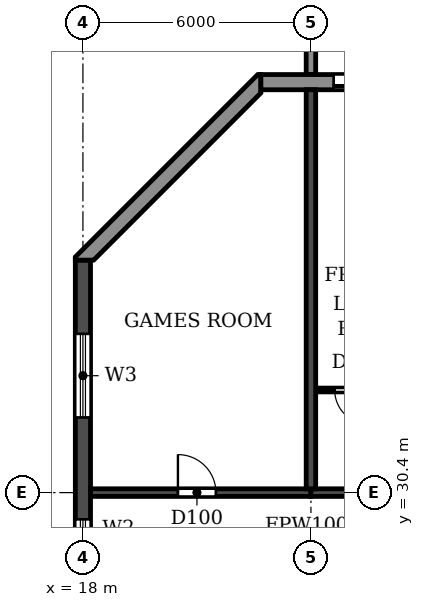
"""IFC4 building model, lengths in metres.
Left out: names, types, materials, properties, quantities, classifications, styles, units other than length and angle.
Written with IfcOpenShell. Run it as: python <this file> out.ifc"""

import sys

from ifc_helpers import new_model, si_unit, direction, frame, frame_2d, origin, place, context, subcontext, project, spatial, polyline, rectangle, outline, extrude, source, transform, mapped, element, fill, save


model = new_model("IFC4")
c1 = context("Model", 3, precision=1e-05, world=origin(), true_north=direction((0.0, 1.0)))
c2 = subcontext(c1, "Body", "Model", "MODEL_VIEW")
j1 = project(units=[si_unit("LENGTHUNIT", "METRE"), si_unit("PLANEANGLEUNIT", "RADIAN")], contexts=[c1])
p1 = place(None, origin())
s1 = spatial("IfcSite", under=j1, at=p1, CompositionType="ELEMENT")
p2 = place(p1, origin())
s2 = spatial("IfcBuilding", under=s1, at=p2, CompositionType="ELEMENT")
p3 = place(p2, frame((0.0, 0.0, 231.3)))
s3 = spatial("IfcBuildingStorey", under=s2, at=p3, CompositionType="ELEMENT", Elevation=231.3)
p4 = place(p3, frame((24.0, 30.5, 0.0), z_axis=(0.0, 0.0, 1.0), x_axis=(0.0, 1.0, 0.0)))
e1 = element("IfcWall", 1, at=p4, inside=s3, PredefinedType="SHEAR", context=c2, shape_type="SweptSolid", body=[
    extrude(rectangle(XDim=10.5, YDim=0.25, at=frame_2d((5.25, 0.0))), origin(), (0.0, 0.0, 1.0), 3.08),
])
p5 = place(p3, frame((18.0, 4.683, 0.0), z_axis=(0.0, 0.0, 1.0), x_axis=(0.0, 1.0, 0.0)))
e2 = element("IfcWall", 2, at=p5, inside=s3, PredefinedType="SHEAR", context=c2, shape_type="SweptSolid", body=[
    extrude(rectangle(XDim=31.834, YDim=0.4, at=frame_2d((15.917, 0.0))), origin(), (0.0, 0.0, 1.0), 3.08),
])
p6 = place(p5, frame((23.817, 0.0, 0.9)))
e3 = element("IfcOpeningElement", 3, at=p6, cuts=e2, PredefinedType="OPENING", context=c2, shape_type="SweptSolid", body=[
    extrude(rectangle(XDim=1.2, YDim=1.5, at=frame_2d((0.6, 0.75))), frame((0.0, 0.21, 0.0), z_axis=(0.0, -1.0, 0.0), x_axis=(1.0, 0.0, 0.0)), (0.0, 0.0, 1.0), 0.42),
])
p7 = place(p5, frame((8.017, 0.0, 0.9)))
e4 = element("IfcOpeningElement", 4, at=p7, cuts=e2, PredefinedType="OPENING", context=c2, shape_type="SweptSolid", body=[
    extrude(rectangle(XDim=1.2, YDim=1.5, at=frame_2d((0.6, 0.75))), frame((0.0, 0.21, 0.0), z_axis=(0.0, -1.0, 0.0), x_axis=(1.0, 0.0, 0.0)), (0.0, 0.0, 1.0), 0.42),
])
p8 = place(p5, frame((27.694, 0.0, 0.6)))
e5 = element("IfcOpeningElement", 5, at=p8, cuts=e2, PredefinedType="OPENING", context=c2, shape_type="SweptSolid", body=[
    extrude(rectangle(XDim=2.2, YDim=1.8, at=frame_2d((1.1, 0.9))), frame((0.0, 0.21, 0.0), z_axis=(0.0, -1.0, 0.0), x_axis=(1.0, 0.0, 0.0)), (0.0, 0.0, 1.0), 0.42),
])
p9 = place(p5, frame((2.541, 0.0, 0.6)))
e6 = element("IfcOpeningElement", 6, at=p9, cuts=e2, PredefinedType="OPENING", context=c2, shape_type="SweptSolid", body=[
    extrude(rectangle(XDim=2.2, YDim=1.8, at=frame_2d((1.1, 0.9))), frame((0.0, 0.21, 0.0), z_axis=(0.0, -1.0, 0.0), x_axis=(1.0, 0.0, 0.0)), (0.0, 0.0, 1.0), 0.42),
])
p10 = place(p5, frame((15.917, 0.0, 0.9)))
e7 = element("IfcOpeningElement", 7, at=p10, cuts=e2, PredefinedType="OPENING", context=c2, shape_type="SweptSolid", body=[
    extrude(rectangle(XDim=1.2, YDim=1.5, at=frame_2d((0.6, 0.75))), frame((0.0, 0.21, 0.0), z_axis=(0.0, -1.0, 0.0), x_axis=(1.0, 0.0, 0.0)), (0.0, 0.0, 1.0), 0.42),
])
p11 = place(p3, frame((18.2, 30.4, 0.0), z_axis=(0.0, 0.0, 1.0), x_axis=(1.0, 0.0, 0.0)))
e8 = element("IfcWall", 8, at=p11, inside=s3, PredefinedType="SHEAR", context=c2, shape_type="SweptSolid", body=[
    extrude(rectangle(XDim=5.8, YDim=0.2, at=frame_2d((2.9, 0.0))), origin(), (0.0, 0.0, 1.0), 2.48),
])
p12 = place(p11, frame((2.3, 0.0, 0.0)))
e9 = element("IfcOpeningElement", 9, at=p12, cuts=e8, PredefinedType="OPENING", context=c2, shape_type="SweptSolid", body=[
    extrude(rectangle(XDim=1.0, YDim=2.1, at=frame_2d((0.5, 1.05))), frame((0.0, 0.11, 0.0), z_axis=(0.0, -1.0, 0.0), x_axis=(1.0, 0.0, 0.0)), (0.0, 0.0, 1.0), 0.22),
])
p13 = place(p3, frame((24.0, 30.4, 0.0), z_axis=(0.0, 0.0, 1.0), x_axis=(1.0, 0.0, 0.0)))
e10 = element("IfcWall", 10, at=p13, inside=s3, PredefinedType="SHEAR", context=c2, shape_type="SweptSolid", body=[
    extrude(rectangle(XDim=6.0, YDim=0.2, at=frame_2d((3.0, 0.0))), origin(), (0.0, 0.0, 1.0), 2.48),
])
p14 = place(p13, frame((2.55, 0.0, 0.0)))
e11 = element("IfcOpeningElement", 11, at=p14, cuts=e10, PredefinedType="OPENING", context=c2, shape_type="SweptSolid", body=[
    extrude(rectangle(XDim=1.0, YDim=2.1, at=frame_2d((0.5, 1.05))), frame((0.0, 0.11, 0.0), z_axis=(0.0, -1.0, 0.0), x_axis=(1.0, 0.0, 0.0)), (0.0, 0.0, 1.0), 0.22),
])
p15 = place(p3, frame((79.317, 41.2, 0.0), z_axis=(0.0, 0.0, 1.0), x_axis=(-1.0, 0.0, 0.0)))
e12 = element("IfcWall", 12, at=p15, inside=s3, PredefinedType="STANDARD", context=c2, shape_type="SweptSolid", body=[
    extrude(rectangle(XDim=56.634, YDim=0.4, at=frame_2d((28.317, 0.0))), origin(), (0.0, 0.0, 1.0), 3.08),
])
p16 = place(p15, frame((52.917, 0.0, 0.0)))
e13 = element("IfcOpeningElement", 13, at=p16, cuts=e12, PredefinedType="OPENING", context=c2, shape_type="SweptSolid", body=[
    extrude(rectangle(XDim=1.8, YDim=2.4, at=frame_2d((0.9, 1.2))), frame((0.0, 0.21, 0.0), z_axis=(0.0, -1.0, 0.0), x_axis=(1.0, 0.0, 0.0)), (0.0, 0.0, 1.0), 0.42),
])
p17 = place(p15, frame((49.717, 0.0, 0.9)))
e14 = element("IfcOpeningElement", 14, at=p17, cuts=e12, PredefinedType="OPENING", context=c2, shape_type="SweptSolid", body=[
    extrude(rectangle(XDim=2.2, YDim=1.5, at=frame_2d((1.1, 0.75))), frame((0.0, 0.21, 0.0), z_axis=(0.0, -1.0, 0.0), x_axis=(1.0, 0.0, 0.0)), (0.0, 0.0, 1.0), 0.42),
])
p18 = place(p15, frame((46.717, 0.0, 0.9)))
e15 = element("IfcOpeningElement", 15, at=p18, cuts=e12, PredefinedType="OPENING", context=c2, shape_type="SweptSolid", body=[
    extrude(rectangle(XDim=2.2, YDim=1.5, at=frame_2d((1.1, 0.75))), frame((0.0, 0.21, 0.0), z_axis=(0.0, -1.0, 0.0), x_axis=(1.0, 0.0, 0.0)), (0.0, 0.0, 1.0), 0.42),
])
p19 = place(p15, frame((43.717, 0.0, 0.9)))
e16 = element("IfcOpeningElement", 16, at=p19, cuts=e12, PredefinedType="OPENING", context=c2, shape_type="SweptSolid", body=[
    extrude(rectangle(XDim=2.2, YDim=1.5, at=frame_2d((1.1, 0.75))), frame((0.0, 0.21, 0.0), z_axis=(0.0, -1.0, 0.0), x_axis=(1.0, 0.0, 0.0)), (0.0, 0.0, 1.0), 0.42),
])
p20 = place(p15, frame((40.717, 0.0, 0.9)))
e17 = element("IfcOpeningElement", 17, at=p20, cuts=e12, PredefinedType="OPENING", context=c2, shape_type="SweptSolid", body=[
    extrude(rectangle(XDim=2.2, YDim=1.5, at=frame_2d((1.1, 0.75))), frame((0.0, 0.21, 0.0), z_axis=(0.0, -1.0, 0.0), x_axis=(1.0, 0.0, 0.0)), (0.0, 0.0, 1.0), 0.42),
])
p21 = place(p15, frame((37.917, 0.0, 0.0)))
e18 = element("IfcOpeningElement", 18, at=p21, cuts=e12, PredefinedType="OPENING", context=c2, shape_type="SweptSolid", body=[
    extrude(rectangle(XDim=1.8, YDim=2.4, at=frame_2d((0.9, 1.2))), frame((0.0, 0.21, 0.0), z_axis=(0.0, -1.0, 0.0), x_axis=(1.0, 0.0, 0.0)), (0.0, 0.0, 1.0), 0.42),
])
p22 = place(p15, frame((34.717, 0.0, 0.9)))
e19 = element("IfcOpeningElement", 19, at=p22, cuts=e12, PredefinedType="OPENING", context=c2, shape_type="SweptSolid", body=[
    extrude(rectangle(XDim=2.2, YDim=1.5, at=frame_2d((1.1, 0.75))), frame((0.0, 0.21, 0.0), z_axis=(0.0, -1.0, 0.0), x_axis=(1.0, 0.0, 0.0)), (0.0, 0.0, 1.0), 0.42),
])
p23 = place(p15, frame((31.917, 0.0, 0.0)))
e20 = element("IfcOpeningElement", 20, at=p23, cuts=e12, PredefinedType="OPENING", context=c2, shape_type="SweptSolid", body=[
    extrude(rectangle(XDim=1.8, YDim=2.4, at=frame_2d((0.9, 1.2))), frame((0.0, 0.21, 0.0), z_axis=(0.0, -1.0, 0.0), x_axis=(1.0, 0.0, 0.0)), (0.0, 0.0, 1.0), 0.42),
])
p24 = place(p15, frame((28.717, 0.0, 0.9)))
e21 = element("IfcOpeningElement", 21, at=p24, cuts=e12, PredefinedType="OPENING", context=c2, shape_type="SweptSolid", body=[
    extrude(rectangle(XDim=2.2, YDim=1.5, at=frame_2d((1.1, 0.75))), frame((0.0, 0.21, 0.0), z_axis=(0.0, -1.0, 0.0), x_axis=(1.0, 0.0, 0.0)), (0.0, 0.0, 1.0), 0.42),
])
p25 = place(p15, frame((25.917, 0.0, 0.0)))
e22 = element("IfcOpeningElement", 22, at=p25, cuts=e12, PredefinedType="OPENING", context=c2, shape_type="SweptSolid", body=[
    extrude(rectangle(XDim=1.8, YDim=2.4, at=frame_2d((0.9, 1.2))), frame((0.0, 0.21, 0.0), z_axis=(0.0, -1.0, 0.0), x_axis=(1.0, 0.0, 0.0)), (0.0, 0.0, 1.0), 0.42),
])
p26 = place(p15, frame((22.717, 0.0, 0.9)))
e23 = element("IfcOpeningElement", 23, at=p26, cuts=e12, PredefinedType="OPENING", context=c2, shape_type="SweptSolid", body=[
    extrude(rectangle(XDim=2.2, YDim=1.5, at=frame_2d((1.1, 0.75))), frame((0.0, 0.21, 0.0), z_axis=(0.0, -1.0, 0.0), x_axis=(1.0, 0.0, 0.0)), (0.0, 0.0, 1.0), 0.42),
])
p27 = place(p15, frame((19.717, 0.0, 0.9)))
e24 = element("IfcOpeningElement", 24, at=p27, cuts=e12, PredefinedType="OPENING", context=c2, shape_type="SweptSolid", body=[
    extrude(rectangle(XDim=2.2, YDim=1.5, at=frame_2d((1.1, 0.75))), frame((0.0, 0.21, 0.0), z_axis=(0.0, -1.0, 0.0), x_axis=(1.0, 0.0, 0.0)), (0.0, 0.0, 1.0), 0.42),
])
p28 = place(p15, frame((16.717, 0.0, 0.9)))
e25 = element("IfcOpeningElement", 25, at=p28, cuts=e12, PredefinedType="OPENING", context=c2, shape_type="SweptSolid", body=[
    extrude(rectangle(XDim=2.2, YDim=1.5, at=frame_2d((1.1, 0.75))), frame((0.0, 0.21, 0.0), z_axis=(0.0, -1.0, 0.0), x_axis=(1.0, 0.0, 0.0)), (0.0, 0.0, 1.0), 0.42),
])
p29 = place(p15, frame((13.917, 0.0, 0.0)))
e26 = element("IfcOpeningElement", 26, at=p29, cuts=e12, PredefinedType="OPENING", context=c2, shape_type="SweptSolid", body=[
    extrude(rectangle(XDim=1.8, YDim=2.4, at=frame_2d((0.9, 1.2))), frame((0.0, 0.21, 0.0), z_axis=(0.0, -1.0, 0.0), x_axis=(1.0, 0.0, 0.0)), (0.0, 0.0, 1.0), 0.42),
])
p30 = place(p15, frame((10.717, 0.0, 0.9)))
e27 = element("IfcOpeningElement", 27, at=p30, cuts=e12, PredefinedType="OPENING", context=c2, shape_type="SweptSolid", body=[
    extrude(rectangle(XDim=2.2, YDim=1.5, at=frame_2d((1.1, 0.75))), frame((0.0, 0.21, 0.0), z_axis=(0.0, -1.0, 0.0), x_axis=(1.0, 0.0, 0.0)), (0.0, 0.0, 1.0), 0.42),
])
p31 = place(p15, frame((7.917, 0.0, 0.0)))
e28 = element("IfcOpeningElement", 28, at=p31, cuts=e12, PredefinedType="OPENING", context=c2, shape_type="SweptSolid", body=[
    extrude(rectangle(XDim=1.8, YDim=2.4, at=frame_2d((0.9, 1.2))), frame((0.0, 0.21, 0.0), z_axis=(0.0, -1.0, 0.0), x_axis=(1.0, 0.0, 0.0)), (0.0, 0.0, 1.0), 0.42),
])
p32 = place(p15, frame((4.717, 0.0, 0.9)))
e29 = element("IfcOpeningElement", 29, at=p32, cuts=e12, PredefinedType="OPENING", context=c2, shape_type="SweptSolid", body=[
    extrude(rectangle(XDim=2.2, YDim=1.5, at=frame_2d((1.1, 0.75))), frame((0.0, 0.21, 0.0), z_axis=(0.0, -1.0, 0.0), x_axis=(1.0, 0.0, 0.0)), (0.0, 0.0, 1.0), 0.42),
])
p33 = place(p15, frame((1.917, 0.0, 0.0)))
e30 = element("IfcOpeningElement", 30, at=p33, cuts=e12, PredefinedType="OPENING", context=c2, shape_type="SweptSolid", body=[
    extrude(rectangle(XDim=1.8, YDim=2.4, at=frame_2d((0.9, 1.2))), frame((0.0, 0.21, 0.0), z_axis=(0.0, -1.0, 0.0), x_axis=(1.0, 0.0, 0.0)), (0.0, 0.0, 1.0), 0.42),
])
p34 = place(p3, origin())
e31 = element("IfcWall", 31, at=p34, inside=s3, PredefinedType="STANDARD", context=c2, shape_type="SweptSolid", body=[
    extrude(outline(polyline([(22.683, 41.4), (22.6, 41.4), (17.8, 36.6), (17.8, 36.517), (18.283, 36.517), (22.683, 40.917), (22.683, 41.4)])), origin(), (0.0, 0.0, 1.0), 3.08),
])
m1 = source(origin(), c2, "Body", "SweptSolid", [
    extrude(outline(polyline([(0.0, 0.0), (0.25, 0.0), (0.25, 3.1), (0.0, 3.1), (0.0, 0.0)])), origin(), (0.0, 0.0, 1.0), 3.1),
])
p35 = place(p3, frame((23.875, 41.4, 0.0)))
e32 = element("IfcWall", 32, at=p35, inside=s3, PredefinedType="STANDARD", context=c2, shape_type="MappedRepresentation", body=[
    mapped(m1, transform((0.0, 0.0, 0.0))),
])
p36 = place(p3, frame((24.135, 33.1, 0.0), z_axis=(0.0, 0.0, 1.0), x_axis=(1.0, 0.0, 0.0)))
e33 = element("IfcWall", 33, at=p36, inside=s3, PredefinedType="PARTITIONING", context=c2, shape_type="SweptSolid", body=[
    extrude(rectangle(XDim=2.065, YDim=0.1, at=frame_2d((1.032, 0.0))), origin(), (0.0, 0.0, 1.0), 3.08),
])
p37 = place(p36, frame((0.49, 0.0, 0.0)))
e34 = element("IfcOpeningElement", 34, at=p37, cuts=e33, PredefinedType="OPENING", context=c2, shape_type="SweptSolid", body=[
    extrude(rectangle(XDim=0.9, YDim=2.1, at=frame_2d((0.45, 1.05))), frame((0.0, 0.06, 0.0), z_axis=(0.0, -1.0, 0.0), x_axis=(1.0, 0.0, 0.0)), (0.0, 0.0, 1.0), 0.12),
])
p38 = place(p16, origin())
e35 = element("IfcDoor", 35, at=p38, inside=s3, OperationType="DOUBLE_DOOR_SLIDING", PredefinedType="DOOR", context=c2, shape_type="SweptSolid", body=[
    extrude(rectangle(XDim=1.8, YDim=2.4, at=frame_2d((0.9, 1.2))), frame((0.0, 0.025, 0.0), z_axis=(0.0, -1.0, 0.0), x_axis=(1.0, 0.0, 0.0)), (0.0, 0.0, 1.0), 0.05),
])
fill(e13, e35)
p39 = place(p6, origin())
e36 = element("IfcWindow", 36, at=p39, inside=s3, PartitioningType="SINGLE_PANEL", PredefinedType="WINDOW", context=c2, shape_type="SweptSolid", body=[
    extrude(rectangle(XDim=1.2, YDim=1.5, at=frame_2d((0.6, 0.75))), frame((0.0, 0.03, 0.0), z_axis=(0.0, -1.0, 0.0), x_axis=(1.0, 0.0, 0.0)), (0.0, 0.0, 1.0), 0.06),
])
fill(e3, e36)
p40 = place(p8, origin())
e37 = element("IfcWindow", 37, at=p40, inside=s3, PartitioningType="DOUBLE_PANEL_HORIZONTAL", PredefinedType="WINDOW", context=c2, shape_type="SweptSolid", body=[
    extrude(rectangle(XDim=2.2, YDim=1.8, at=frame_2d((1.1, 0.9))), frame((0.0, 0.03, 0.0), z_axis=(0.0, -1.0, 0.0), x_axis=(1.0, 0.0, 0.0)), (0.0, 0.0, 1.0), 0.06),
])
fill(e5, e37)
p41 = place(p12, origin())
e38 = element("IfcDoor", 38, at=p41, inside=s3, OperationType="SINGLE_SWING_LEFT", PredefinedType="DOOR", context=c2, shape_type="SweptSolid", body=[
    extrude(rectangle(XDim=1.0, YDim=2.1, at=frame_2d((0.5, 1.05))), frame((0.0, 0.025, 0.0), z_axis=(0.0, -1.0, 0.0), x_axis=(1.0, 0.0, 0.0)), (0.0, 0.0, 1.0), 0.05),
])
fill(e9, e38)
p42 = place(p37, frame((0.9, 0.0, 0.0), z_axis=(0.0, 0.0, 1.0), x_axis=(-1.0, 0.0, 0.0)))
e39 = element("IfcDoor", 39, at=p42, inside=s3, OperationType="SINGLE_SWING_LEFT", PredefinedType="DOOR", context=c2, shape_type="SweptSolid", body=[
    extrude(rectangle(XDim=0.9, YDim=2.1, at=frame_2d((0.45, 1.05))), frame((0.0, 0.025, 0.0), z_axis=(0.0, -1.0, 0.0), x_axis=(1.0, 0.0, 0.0)), (0.0, 0.0, 1.0), 0.05),
])
fill(e34, e39)
save(model, sys.argv[1])
